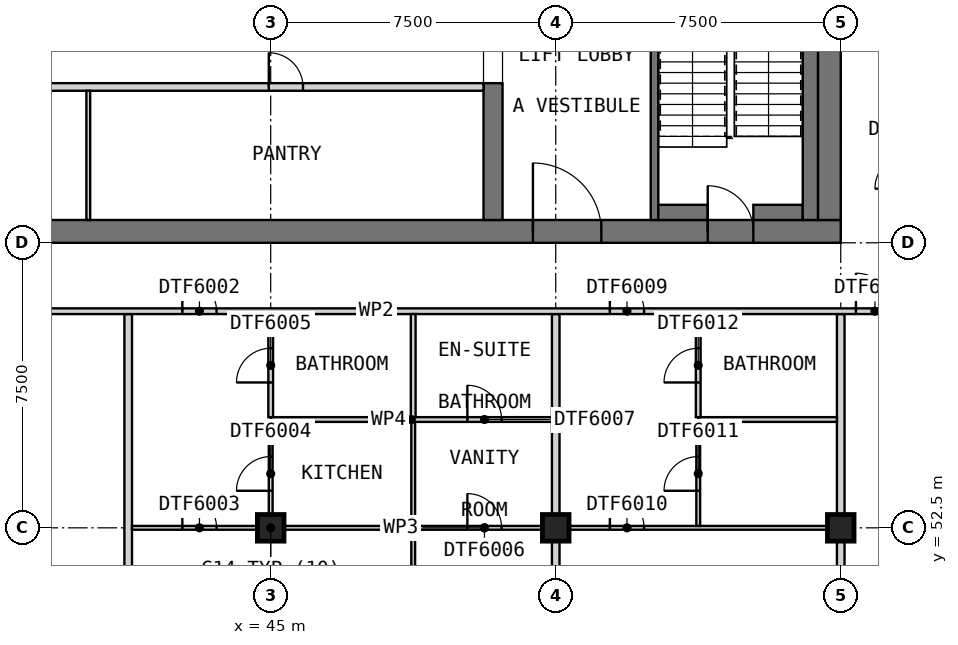
"""IFC4 building model, lengths in metres.
Left out: names, types, materials, properties, quantities, classifications, styles, units other than length and angle.
Written with IfcOpenShell. Run it as: python <this file> out.ifc"""

import sys

from ifc_helpers import new_model, si_unit, direction, frame, frame_2d, origin, origin_2d, place, context, subcontext, project, spatial, rectangle, extrude, element, fill, save


model = new_model("IFC4")
c1 = context("Model", 3, precision=1e-05, world=origin(), true_north=direction((0.0, 1.0)))
c2 = subcontext(c1, "Body", "Model", "MODEL_VIEW")
j1 = project(units=[si_unit("LENGTHUNIT", "METRE"), si_unit("PLANEANGLEUNIT", "RADIAN")], contexts=[c1])
p1 = place(None, origin())
s1 = spatial("IfcSite", under=j1, at=p1, CompositionType="ELEMENT")
p2 = place(p1, origin())
s2 = spatial("IfcBuilding", under=s1, at=p2, CompositionType="ELEMENT")
p3 = place(p2, frame((0.0, 0.0, 266.2)))
s3 = spatial("IfcBuildingStorey", under=s2, at=p3, CompositionType="ELEMENT", Elevation=266.2)
for number, where, z_axis, x_axis in (
    (1, (45.0, 52.5, 0.0), (0.0, 0.0, 1.0), (1.0, 0.0, 0.0)),
    (2, (52.5, 52.5, 0.0), (0.0, 0.0, 1.0), (1.0, 0.0, 0.0)),
    (3, (60.0, 52.5, 0.0), (0.0, 0.0, 1.0), (1.0, 0.0, 0.0)),
):
    element("IfcColumn", number, at=place(p3, frame(where, z_axis=z_axis, x_axis=x_axis)), inside=s3, PredefinedType="COLUMN", context=c2, shape_type="SweptSolid", body=[
        extrude(rectangle(XDim=0.7, YDim=0.7, at=origin_2d()), origin(), (0.0, 0.0, 1.0), 3.5),
    ])
p4 = place(p3, frame((30.0, 60.3, 0.0), z_axis=(0.0, 0.0, 1.0), x_axis=(1.0, 0.0, 0.0)))
e4 = element("IfcWall", 4, at=p4, inside=s3, PredefinedType="SHEAR", context=c2, shape_type="SweptSolid", body=[
    extrude(rectangle(XDim=30.0, YDim=0.6, at=frame_2d((15.0, 0.0))), origin(), (0.0, 0.0, 1.0), 3.5),
])
p5 = place(p4, frame((21.9, 0.0, 0.0)))
e5 = element("IfcOpeningElement", 5, at=p5, cuts=e4, PredefinedType="OPENING", context=c2, shape_type="SweptSolid", body=[
    extrude(rectangle(XDim=1.8, YDim=2.1, at=frame_2d((0.9, 1.05))), frame((0.0, 0.31, 0.0), z_axis=(0.0, -1.0, 0.0), x_axis=(1.0, 0.0, 0.0)), (0.0, 0.0, 1.0), 0.62),
])
p6 = place(p4, frame((26.5, 0.0, 0.0)))
e6 = element("IfcOpeningElement", 6, at=p6, cuts=e4, PredefinedType="OPENING", context=c2, shape_type="SweptSolid", body=[
    extrude(rectangle(XDim=1.2, YDim=2.1, at=frame_2d((0.6, 1.05))), frame((0.0, 0.31, 0.0), z_axis=(0.0, -1.0, 0.0), x_axis=(1.0, 0.0, 0.0)), (0.0, 0.0, 1.0), 0.62),
])
p7 = place(p3, frame((59.7, 60.6, 0.0), z_axis=(0.0, 0.0, 1.0), x_axis=(0.0, 1.0, 0.0)))
e7 = element("IfcWall", 7, at=p7, inside=s3, PredefinedType="SHEAR", context=c2, shape_type="SweptSolid", body=[
    extrude(rectangle(XDim=21.3, YDim=0.6, at=frame_2d((10.65, 0.0))), origin(), (0.0, 0.0, 1.0), 3.5),
])
p8 = place(p7, frame((14.9, 0.0, 0.0)))
e8 = element("IfcOpeningElement", 8, at=p8, cuts=e7, PredefinedType="OPENING", context=c2, shape_type="SweptSolid", body=[
    extrude(rectangle(XDim=1.8, YDim=2.1, at=frame_2d((0.9, 1.05))), frame((0.0, 0.31, 0.0), z_axis=(0.0, -1.0, 0.0), x_axis=(1.0, 0.0, 0.0)), (0.0, 0.0, 1.0), 0.62),
])
p9 = place(p3, frame((50.85, 60.6, 0.0), z_axis=(0.0, 0.0, 1.0), x_axis=(0.0, 1.0, 0.0)))
e9 = element("IfcWall", 9, at=p9, inside=s3, PredefinedType="SHEAR", context=c2, shape_type="SweptSolid", body=[
    extrude(rectangle(XDim=3.6, YDim=0.5, at=frame_2d((1.8, 0.0))), origin(), (0.0, 0.0, 1.0), 3.5),
])
p10 = place(p3, frame((35.0, 64.1, 0.0), z_axis=(0.0, 0.0, 1.0), x_axis=(1.0, 0.0, 0.0)))
e10 = element("IfcWall", 10, at=p10, inside=s3, PredefinedType="PARTITIONING", context=c2, shape_type="SweptSolid", body=[
    extrude(rectangle(XDim=15.6, YDim=0.2, at=frame_2d((7.8, 0.0))), origin(), (0.0, 0.0, 1.0), 3.25),
])
p11 = place(p10, frame((2.15, 0.0, 0.0)))
e11 = element("IfcOpeningElement", 11, at=p11, cuts=e10, PredefinedType="OPENING", context=c2, shape_type="SweptSolid", body=[
    extrude(rectangle(XDim=0.9, YDim=2.1, at=frame_2d((0.45, 1.05))), frame((0.0, 0.11, 0.0), z_axis=(0.0, -1.0, 0.0), x_axis=(1.0, 0.0, 0.0)), (0.0, 0.0, 1.0), 0.22),
])
p12 = place(p10, frame((9.95, 0.0, 0.0)))
e12 = element("IfcOpeningElement", 12, at=p12, cuts=e10, PredefinedType="OPENING", context=c2, shape_type="SweptSolid", body=[
    extrude(rectangle(XDim=0.9, YDim=2.1, at=frame_2d((0.45, 1.05))), frame((0.0, 0.11, 0.0), z_axis=(0.0, -1.0, 0.0), x_axis=(1.0, 0.0, 0.0)), (0.0, 0.0, 1.0), 0.22),
])
p13 = place(p3, frame((40.2, 60.6, 0.0), z_axis=(0.0, 0.0, 1.0), x_axis=(0.0, 1.0, 0.0)))
e13 = element("IfcWall", 13, at=p13, inside=s3, PredefinedType="PARTITIONING", context=c2, shape_type="SweptSolid", body=[
    extrude(rectangle(XDim=3.4, YDim=0.1, at=frame_2d((1.7, 0.0))), origin(), (0.0, 0.0, 1.0), 3.25),
])
p14 = place(p3, frame((55.1, 60.6, 0.0), z_axis=(0.0, 0.0, 1.0), x_axis=(0.0, 1.0, 0.0)))
e14 = element("IfcWall", 14, at=p14, inside=s3, PredefinedType="SOLIDWALL", context=c2, shape_type="SweptSolid", body=[
    extrude(rectangle(XDim=8.0, YDim=0.2, at=frame_2d((4.0, 0.0))), origin(), (0.0, 0.0, 1.0), 3.25),
])
for number, where, z_axis, x_axis in (
    (15, (55.2, 60.8, 0.0), (0.0, 0.0, 1.0), (1.0, 0.0, 0.0)),
    (16, (57.7, 60.8, 0.0), (0.0, 0.0, 1.0), (1.0, 0.0, 0.0)),
):
    element("IfcWall", number, at=place(p3, frame(where, z_axis=z_axis, x_axis=x_axis)), inside=s3, PredefinedType="SOLIDWALL", context=c2, shape_type="SweptSolid", body=[
        extrude(rectangle(XDim=1.3, YDim=0.4, at=frame_2d((0.65, 0.0))), origin(), (0.0, 0.0, 1.0), 3.25),
    ])
p15 = place(p3, frame((59.2, 60.6, 0.0), z_axis=(0.0, 0.0, 1.0), x_axis=(0.0, 1.0, 0.0)))
e17 = element("IfcWall", 17, at=p15, inside=s3, PredefinedType="SOLIDWALL", context=c2, shape_type="SweptSolid", body=[
    extrude(rectangle(XDim=7.9, YDim=0.4, at=frame_2d((3.95, 0.0))), origin(), (0.0, 0.0, 1.0), 3.25),
])
p16 = place(p3, frame((41.25, 45.81, 0.0), z_axis=(0.0, 0.0, 1.0), x_axis=(0.0, 1.0, 0.0)))
e18 = element("IfcWall", 18, at=p16, inside=s3, PredefinedType="PARTITIONING", context=c2, shape_type="SweptSolid", body=[
    extrude(rectangle(XDim=12.315, YDim=0.2, at=frame_2d((6.157, 0.0))), origin(), (0.0, 0.0, 1.0), 3.25),
])
for number, where, z_axis, x_axis in (
    (19, (52.5, 45.0, 0.0), (0.0, 0.0, 1.0), (0.0, 1.0, 0.0)),
    (20, (60.0, 45.0, 0.0), (0.0, 0.0, 1.0), (0.0, 1.0, 0.0)),
):
    element("IfcWall", number, at=place(p3, frame(where, z_axis=z_axis, x_axis=x_axis)), inside=s3, PredefinedType="PARTITIONING", context=c2, shape_type="SweptSolid", body=[
        extrude(rectangle(XDim=13.125, YDim=0.2, at=frame_2d((6.562, 0.0))), origin(), (0.0, 0.0, 1.0), 3.25),
    ])
p17 = place(p3, frame((33.75, 58.2, 0.0), z_axis=(0.0, 0.0, 1.0), x_axis=(1.0, 0.0, 0.0)))
e21 = element("IfcWall", 21, at=p17, inside=s3, PredefinedType="PARTITIONING", context=c2, shape_type="SweptSolid", body=[
    extrude(rectangle(XDim=28.05, YDim=0.15, at=frame_2d((14.025, 0.0))), origin(), (0.0, 0.0, 1.0), 3.25),
])
p18 = place(p17, frame((3.25, 0.0, 0.0)))
e22 = element("IfcOpeningElement", 22, at=p18, cuts=e21, PredefinedType="OPENING", context=c2, shape_type="SweptSolid", body=[
    extrude(rectangle(XDim=1.0, YDim=2.1, at=frame_2d((0.5, 1.05))), frame((0.0, 0.085, 0.0), z_axis=(0.0, -1.0, 0.0), x_axis=(1.0, 0.0, 0.0)), (0.0, 0.0, 1.0), 0.17),
])
p19 = place(p17, frame((8.925, 0.0, 0.0)))
e23 = element("IfcOpeningElement", 23, at=p19, cuts=e21, PredefinedType="OPENING", context=c2, shape_type="SweptSolid", body=[
    extrude(rectangle(XDim=0.9, YDim=2.1, at=frame_2d((0.45, 1.05))), frame((0.0, 0.085, 0.0), z_axis=(0.0, -1.0, 0.0), x_axis=(1.0, 0.0, 0.0)), (0.0, 0.0, 1.0), 0.17),
])
p20 = place(p17, frame((20.175, 0.0, 0.0)))
e24 = element("IfcOpeningElement", 24, at=p20, cuts=e21, PredefinedType="OPENING", context=c2, shape_type="SweptSolid", body=[
    extrude(rectangle(XDim=0.9, YDim=2.1, at=frame_2d((0.45, 1.05))), frame((0.0, 0.085, 0.0), z_axis=(0.0, -1.0, 0.0), x_axis=(1.0, 0.0, 0.0)), (0.0, 0.0, 1.0), 0.17),
])
p21 = place(p17, frame((26.65, 0.0, 0.0)))
e25 = element("IfcOpeningElement", 25, at=p21, cuts=e21, PredefinedType="OPENING", context=c2, shape_type="SweptSolid", body=[
    extrude(rectangle(XDim=1.0, YDim=2.1, at=frame_2d((0.5, 1.05))), frame((0.0, 0.085, 0.0), z_axis=(0.0, -1.0, 0.0), x_axis=(1.0, 0.0, 0.0)), (0.0, 0.0, 1.0), 0.17),
])
p22 = place(p3, frame((41.35, 52.5, 0.0), z_axis=(0.0, 0.0, 1.0), x_axis=(1.0, 0.0, 0.0)))
e26 = element("IfcWall", 26, at=p22, inside=s3, PredefinedType="PARTITIONING", context=c2, shape_type="SweptSolid", body=[
    extrude(rectangle(XDim=18.55, YDim=0.1, at=frame_2d((9.275, 0.0))), origin(), (0.0, 0.0, 1.0), 3.25),
])
p23 = place(p22, frame((1.325, 0.0, 0.0)))
e27 = element("IfcOpeningElement", 27, at=p23, cuts=e26, PredefinedType="OPENING", context=c2, shape_type="SweptSolid", body=[
    extrude(rectangle(XDim=0.9, YDim=2.1, at=frame_2d((0.45, 1.05))), frame((0.0, 0.06, 0.0), z_axis=(0.0, -1.0, 0.0), x_axis=(1.0, 0.0, 0.0)), (0.0, 0.0, 1.0), 0.12),
])
p24 = place(p22, frame((8.825, 0.0, 0.0)))
e28 = element("IfcOpeningElement", 28, at=p24, cuts=e26, PredefinedType="OPENING", context=c2, shape_type="SweptSolid", body=[
    extrude(rectangle(XDim=0.9, YDim=2.1, at=frame_2d((0.45, 1.05))), frame((0.0, 0.06, 0.0), z_axis=(0.0, -1.0, 0.0), x_axis=(1.0, 0.0, 0.0)), (0.0, 0.0, 1.0), 0.12),
])
p25 = place(p22, frame((12.575, 0.0, 0.0)))
e29 = element("IfcOpeningElement", 29, at=p25, cuts=e26, PredefinedType="OPENING", context=c2, shape_type="SweptSolid", body=[
    extrude(rectangle(XDim=0.9, YDim=2.1, at=frame_2d((0.45, 1.05))), frame((0.0, 0.06, 0.0), z_axis=(0.0, -1.0, 0.0), x_axis=(1.0, 0.0, 0.0)), (0.0, 0.0, 1.0), 0.12),
])
p26 = place(p3, frame((45.0, 52.55, 0.0), z_axis=(0.0, 0.0, 1.0), x_axis=(0.0, 1.0, 0.0)))
e30 = element("IfcWall", 30, at=p26, inside=s3, PredefinedType="PARTITIONING", context=c2, shape_type="SweptSolid", body=[
    extrude(rectangle(XDim=2.738, YDim=0.1, at=frame_2d((1.369, 0.0))), origin(), (0.0, 0.0, 1.0), 3.25),
])
p27 = place(p26, frame((0.925, 0.0, 0.0)))
e31 = element("IfcOpeningElement", 31, at=p27, cuts=e30, PredefinedType="OPENING", context=c2, shape_type="SweptSolid", body=[
    extrude(rectangle(XDim=0.9, YDim=2.1, at=frame_2d((0.45, 1.05))), frame((0.0, 0.06, 0.0), z_axis=(0.0, -1.0, 0.0), x_axis=(1.0, 0.0, 0.0)), (0.0, 0.0, 1.0), 0.12),
])
p28 = place(p3, frame((48.75, 45.81, 0.0), z_axis=(0.0, 0.0, 1.0), x_axis=(0.0, 1.0, 0.0)))
e32 = element("IfcWall", 32, at=p28, inside=s3, PredefinedType="PARTITIONING", context=c2, shape_type="SweptSolid", body=[
    extrude(rectangle(XDim=9.478, YDim=0.1, at=frame_2d((4.739, 0.0))), origin(), (0.0, 0.0, 1.0), 3.25),
])
p29 = place(p28, frame((2.49, 0.0, 0.0)))
e33 = element("IfcOpeningElement", 33, at=p29, cuts=e32, PredefinedType="OPENING", context=c2, shape_type="SweptSolid", body=[
    extrude(rectangle(XDim=0.9, YDim=2.1, at=frame_2d((0.45, 1.05))), frame((0.0, 0.06, 0.0), z_axis=(0.0, -1.0, 0.0), x_axis=(1.0, 0.0, 0.0)), (0.0, 0.0, 1.0), 0.12),
])
p30 = place(p3, frame((56.25, 52.55, 0.0), z_axis=(0.0, 0.0, 1.0), x_axis=(0.0, 1.0, 0.0)))
e34 = element("IfcWall", 34, at=p30, inside=s3, PredefinedType="PARTITIONING", context=c2, shape_type="SweptSolid", body=[
    extrude(rectangle(XDim=2.738, YDim=0.1, at=frame_2d((1.369, 0.0))), origin(), (0.0, 0.0, 1.0), 3.25),
])
p31 = place(p30, frame((0.925, 0.0, 0.0)))
e35 = element("IfcOpeningElement", 35, at=p31, cuts=e34, PredefinedType="OPENING", context=c2, shape_type="SweptSolid", body=[
    extrude(rectangle(XDim=0.9, YDim=2.1, at=frame_2d((0.45, 1.05))), frame((0.0, 0.06, 0.0), z_axis=(0.0, -1.0, 0.0), x_axis=(1.0, 0.0, 0.0)), (0.0, 0.0, 1.0), 0.12),
])
p32 = place(p3, frame((45.0, 55.35, 0.0), z_axis=(0.0, 0.0, 1.0), x_axis=(1.0, 0.0, 0.0)))
e36 = element("IfcWall", 36, at=p32, inside=s3, PredefinedType="PARTITIONING", context=c2, shape_type="SweptSolid", body=[
    extrude(rectangle(XDim=7.4, YDim=0.125, at=frame_2d((3.7, 0.0))), origin(), (0.0, 0.0, 1.0), 3.25),
])
p33 = place(p32, frame((5.175, 0.0, 0.0)))
e37 = element("IfcOpeningElement", 37, at=p33, cuts=e36, PredefinedType="OPENING", context=c2, shape_type="SweptSolid", body=[
    extrude(rectangle(XDim=0.9, YDim=2.1, at=frame_2d((0.45, 1.05))), frame((0.0, 0.073, 0.0), z_axis=(0.0, -1.0, 0.0), x_axis=(1.0, 0.0, 0.0)), (0.0, 0.0, 1.0), 0.145),
])
p34 = place(p3, frame((56.25, 55.35, 0.0), z_axis=(0.0, 0.0, 1.0), x_axis=(1.0, 0.0, 0.0)))
e38 = element("IfcWall", 38, at=p34, inside=s3, PredefinedType="PARTITIONING", context=c2, shape_type="SweptSolid", body=[
    extrude(rectangle(XDim=3.65, YDim=0.125, at=frame_2d((1.825, 0.0))), origin(), (0.0, 0.0, 1.0), 3.25),
])
p35 = place(p3, frame((45.0, 55.413, 0.0), z_axis=(0.0, 0.0, 1.0), x_axis=(0.0, 1.0, 0.0)))
e39 = element("IfcWall", 39, at=p35, inside=s3, PredefinedType="PARTITIONING", context=c2, shape_type="SweptSolid", body=[
    extrude(rectangle(XDim=2.712, YDim=0.125, at=frame_2d((1.356, 0.0))), origin(), (0.0, 0.0, 1.0), 3.25),
])
p36 = place(p35, frame((0.913, 0.0, 0.0)))
e40 = element("IfcOpeningElement", 40, at=p36, cuts=e39, PredefinedType="OPENING", context=c2, shape_type="SweptSolid", body=[
    extrude(rectangle(XDim=0.9, YDim=2.1, at=frame_2d((0.45, 1.05))), frame((0.0, 0.073, 0.0), z_axis=(0.0, -1.0, 0.0), x_axis=(1.0, 0.0, 0.0)), (0.0, 0.0, 1.0), 0.145),
])
p37 = place(p3, frame((48.75, 55.413, 0.0), z_axis=(0.0, 0.0, 1.0), x_axis=(0.0, 1.0, 0.0)))
e41 = element("IfcWall", 41, at=p37, inside=s3, PredefinedType="PARTITIONING", context=c2, shape_type="SweptSolid", body=[
    extrude(rectangle(XDim=2.712, YDim=0.125, at=frame_2d((1.356, 0.0))), origin(), (0.0, 0.0, 1.0), 3.25),
])
p38 = place(p3, frame((56.25, 55.413, 0.0), z_axis=(0.0, 0.0, 1.0), x_axis=(0.0, 1.0, 0.0)))
e42 = element("IfcWall", 42, at=p38, inside=s3, PredefinedType="PARTITIONING", context=c2, shape_type="SweptSolid", body=[
    extrude(rectangle(XDim=2.712, YDim=0.125, at=frame_2d((1.356, 0.0))), origin(), (0.0, 0.0, 1.0), 3.25),
])
p39 = place(p38, frame((0.913, 0.0, 0.0)))
e43 = element("IfcOpeningElement", 43, at=p39, cuts=e42, PredefinedType="OPENING", context=c2, shape_type="SweptSolid", body=[
    extrude(rectangle(XDim=0.9, YDim=2.1, at=frame_2d((0.45, 1.05))), frame((0.0, 0.073, 0.0), z_axis=(0.0, -1.0, 0.0), x_axis=(1.0, 0.0, 0.0)), (0.0, 0.0, 1.0), 0.145),
])
p40 = place(p12, origin())
e44 = element("IfcDoor", 44, at=p40, inside=s3, OperationType="SINGLE_SWING_LEFT", PredefinedType="DOOR", context=c2, shape_type="SweptSolid", body=[
    extrude(rectangle(XDim=0.9, YDim=2.1, at=frame_2d((0.45, 1.05))), frame((0.0, 0.025, 0.0), z_axis=(0.0, -1.0, 0.0), x_axis=(1.0, 0.0, 0.0)), (0.0, 0.0, 1.0), 0.05),
])
fill(e12, e44)
p41 = place(p5, origin())
e45 = element("IfcDoor", 45, at=p41, inside=s3, OperationType="DOUBLE_DOOR_SINGLE_SWING", PredefinedType="DOOR", context=c2, shape_type="SweptSolid", body=[
    extrude(rectangle(XDim=1.8, YDim=2.1, at=frame_2d((0.9, 1.05))), frame((0.0, 0.025, 0.0), z_axis=(0.0, -1.0, 0.0), x_axis=(1.0, 0.0, 0.0)), (0.0, 0.0, 1.0), 0.05),
])
fill(e5, e45)
p42 = place(p6, origin())
e46 = element("IfcDoor", 46, at=p42, inside=s3, OperationType="SINGLE_SWING_LEFT", PredefinedType="DOOR", context=c2, shape_type="SweptSolid", body=[
    extrude(rectangle(XDim=1.2, YDim=2.1, at=frame_2d((0.6, 1.05))), frame((0.0, 0.025, 0.0), z_axis=(0.0, -1.0, 0.0), x_axis=(1.0, 0.0, 0.0)), (0.0, 0.0, 1.0), 0.05),
])
fill(e6, e46)
p43 = place(p19, origin())
e47 = element("IfcDoor", 47, at=p43, inside=s3, OperationType="SINGLE_SWING_RIGHT", PredefinedType="DOOR", context=c2, shape_type="SweptSolid", body=[
    extrude(rectangle(XDim=0.9, YDim=2.1, at=frame_2d((0.45, 1.05))), frame((0.0, 0.025, 0.0), z_axis=(0.0, -1.0, 0.0), x_axis=(1.0, 0.0, 0.0)), (0.0, 0.0, 1.0), 0.05),
])
fill(e23, e47)
p44 = place(p23, origin())
e48 = element("IfcDoor", 48, at=p44, inside=s3, OperationType="SINGLE_SWING_LEFT", PredefinedType="DOOR", context=c2, shape_type="SweptSolid", body=[
    extrude(rectangle(XDim=0.9, YDim=2.1, at=frame_2d((0.45, 1.05))), frame((0.0, 0.025, 0.0), z_axis=(0.0, -1.0, 0.0), x_axis=(1.0, 0.0, 0.0)), (0.0, 0.0, 1.0), 0.05),
])
fill(e27, e48)
p45 = place(p27, origin())
e49 = element("IfcDoor", 49, at=p45, inside=s3, OperationType="SINGLE_SWING_RIGHT", PredefinedType="DOOR", context=c2, shape_type="SweptSolid", body=[
    extrude(rectangle(XDim=0.9, YDim=2.1, at=frame_2d((0.45, 1.05))), frame((0.0, 0.025, 0.0), z_axis=(0.0, -1.0, 0.0), x_axis=(1.0, 0.0, 0.0)), (0.0, 0.0, 1.0), 0.05),
])
fill(e31, e49)
p46 = place(p36, origin())
e50 = element("IfcDoor", 50, at=p46, inside=s3, OperationType="SINGLE_SWING_RIGHT", PredefinedType="DOOR", context=c2, shape_type="SweptSolid", body=[
    extrude(rectangle(XDim=0.9, YDim=2.1, at=frame_2d((0.45, 1.05))), frame((0.0, 0.025, 0.0), z_axis=(0.0, -1.0, 0.0), x_axis=(1.0, 0.0, 0.0)), (0.0, 0.0, 1.0), 0.05),
])
fill(e40, e50)
p47 = place(p24, origin())
e51 = element("IfcDoor", 51, at=p47, inside=s3, OperationType="SINGLE_SWING_LEFT", PredefinedType="DOOR", context=c2, shape_type="SweptSolid", body=[
    extrude(rectangle(XDim=0.9, YDim=2.1, at=frame_2d((0.45, 1.05))), frame((0.0, 0.025, 0.0), z_axis=(0.0, -1.0, 0.0), x_axis=(1.0, 0.0, 0.0)), (0.0, 0.0, 1.0), 0.05),
])
fill(e28, e51)
p48 = place(p33, origin())
e52 = element("IfcDoor", 52, at=p48, inside=s3, OperationType="SINGLE_SWING_LEFT", PredefinedType="DOOR", context=c2, shape_type="SweptSolid", body=[
    extrude(rectangle(XDim=0.9, YDim=2.1, at=frame_2d((0.45, 1.05))), frame((0.0, 0.025, 0.0), z_axis=(0.0, -1.0, 0.0), x_axis=(1.0, 0.0, 0.0)), (0.0, 0.0, 1.0), 0.05),
])
fill(e37, e52)
p49 = place(p20, origin())
e53 = element("IfcDoor", 53, at=p49, inside=s3, OperationType="SINGLE_SWING_RIGHT", PredefinedType="DOOR", context=c2, shape_type="SweptSolid", body=[
    extrude(rectangle(XDim=0.9, YDim=2.1, at=frame_2d((0.45, 1.05))), frame((0.0, 0.025, 0.0), z_axis=(0.0, -1.0, 0.0), x_axis=(1.0, 0.0, 0.0)), (0.0, 0.0, 1.0), 0.05),
])
fill(e24, e53)
p50 = place(p25, origin())
e54 = element("IfcDoor", 54, at=p50, inside=s3, OperationType="SINGLE_SWING_LEFT", PredefinedType="DOOR", context=c2, shape_type="SweptSolid", body=[
    extrude(rectangle(XDim=0.9, YDim=2.1, at=frame_2d((0.45, 1.05))), frame((0.0, 0.025, 0.0), z_axis=(0.0, -1.0, 0.0), x_axis=(1.0, 0.0, 0.0)), (0.0, 0.0, 1.0), 0.05),
])
fill(e29, e54)
p51 = place(p31, origin())
e55 = element("IfcDoor", 55, at=p51, inside=s3, OperationType="SINGLE_SWING_RIGHT", PredefinedType="DOOR", context=c2, shape_type="SweptSolid", body=[
    extrude(rectangle(XDim=0.9, YDim=2.1, at=frame_2d((0.45, 1.05))), frame((0.0, 0.025, 0.0), z_axis=(0.0, -1.0, 0.0), x_axis=(1.0, 0.0, 0.0)), (0.0, 0.0, 1.0), 0.05),
])
fill(e35, e55)
p52 = place(p39, origin())
e56 = element("IfcDoor", 56, at=p52, inside=s3, OperationType="SINGLE_SWING_RIGHT", PredefinedType="DOOR", context=c2, shape_type="SweptSolid", body=[
    extrude(rectangle(XDim=0.9, YDim=2.1, at=frame_2d((0.45, 1.05))), frame((0.0, 0.025, 0.0), z_axis=(0.0, -1.0, 0.0), x_axis=(1.0, 0.0, 0.0)), (0.0, 0.0, 1.0), 0.05),
])
fill(e43, e56)
p53 = place(p21, origin())
e57 = element("IfcDoor", 57, at=p53, inside=s3, OperationType="SINGLE_SWING_RIGHT", PredefinedType="DOOR", context=c2, shape_type="SweptSolid", body=[
    extrude(rectangle(XDim=1.0, YDim=2.1, at=frame_2d((0.5, 1.05))), frame((0.0, 0.025, 0.0), z_axis=(0.0, -1.0, 0.0), x_axis=(1.0, 0.0, 0.0)), (0.0, 0.0, 1.0), 0.05),
])
fill(e25, e57)
save(model, sys.argv[1])
